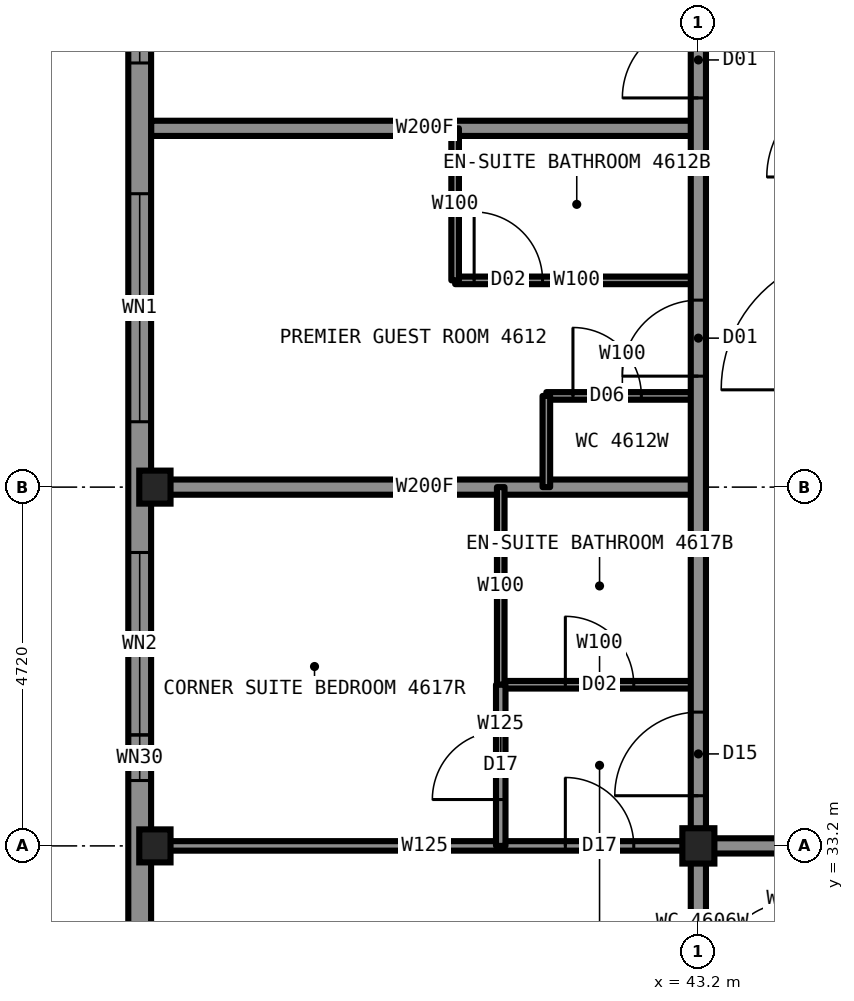
"""IFC4 building model, lengths in metres.
Left out: names, types, materials, properties, quantities, classifications, styles, units other than length and angle.
Written with IfcOpenShell. Run it as: python <this file> out.ifc"""

import sys

from ifc_helpers import new_model, si_unit, direction, frame, frame_2d, origin, origin_2d, place, context, subcontext, project, spatial, rectangle, i_section, extrude, element, fill, save


model = new_model("IFC4")
c1 = context("Model", 3, precision=1e-05, world=origin(), true_north=direction((0.0, 1.0)))
c2 = subcontext(c1, "Body", "Model", "MODEL_VIEW")
j1 = project(units=[si_unit("LENGTHUNIT", "METRE"), si_unit("PLANEANGLEUNIT", "RADIAN")], contexts=[c1])
p1 = place(None, origin())
s1 = spatial("IfcSite", under=j1, at=p1, CompositionType="ELEMENT")
p2 = place(p1, origin())
s2 = spatial("IfcBuilding", under=s1, at=p2, CompositionType="ELEMENT")
p3 = place(p2, frame((0.0, 0.0, 172.3)))
s3 = spatial("IfcBuildingStorey", under=s2, at=p3, CompositionType="ELEMENT", Elevation=172.3)
for number, where, z_axis, x_axis in (
    (1, (36.05, 33.2, 0.0), (0.0, 0.0, 1.0), (1.0, 0.0, 0.0)),
    (2, (36.05, 37.92, 0.0), (0.0, 0.0, 1.0), (1.0, 0.0, 0.0)),
):
    element("IfcColumn", number, at=place(p3, frame(where, z_axis=z_axis, x_axis=x_axis)), inside=s3, PredefinedType="COLUMN", context=c2, shape_type="SweptSolid", body=[
        extrude(i_section(OverallWidth=0.411, OverallDepth=0.434, WebThickness=0.036, FlangeThickness=0.057, at=origin_2d()), origin(), (0.0, 0.0, 1.0), 3.5),
    ])
p4 = place(p3, frame((43.2, 33.2, 0.0), z_axis=(0.0, 0.0, 1.0), x_axis=(1.0, 0.0, 0.0)))
e3 = element("IfcColumn", 3, at=p4, inside=s3, PredefinedType="COLUMN", context=c2, shape_type="SweptSolid", body=[
    extrude(i_section(OverallWidth=0.422, OverallDepth=0.465, WebThickness=0.045, FlangeThickness=0.073, at=origin_2d()), origin(), (0.0, 0.0, 1.0), 3.5),
])
p5 = place(p3, frame((43.2, 33.2, 0.0), z_axis=(0.0, 0.0, 1.0), x_axis=(1.0, 0.0, 0.0)))
e4 = element("IfcWall", 4, at=p5, inside=s3, PredefinedType="PARTITIONING", context=c2, shape_type="SweptSolid", body=[
    extrude(rectangle(XDim=23.6, YDim=0.2, at=frame_2d((11.8, 0.0))), origin(), (0.0, 0.0, 1.0), 3.33),
])
p6 = place(p5, frame((1.46, 0.0, 0.0)))
e5 = element("IfcOpeningElement", 5, at=p6, cuts=e4, PredefinedType="OPENING", context=c2, shape_type="SweptSolid", body=[
    extrude(rectangle(XDim=1.0, YDim=2.2, at=frame_2d((0.5, 1.1))), frame((0.0, 0.11, 0.0), z_axis=(0.0, -1.0, 0.0), x_axis=(1.0, 0.0, 0.0)), (0.0, 0.0, 1.0), 0.22),
])
p7 = place(p5, frame((7.72, 0.0, 0.0)))
e6 = element("IfcOpeningElement", 6, at=p7, cuts=e4, PredefinedType="OPENING", context=c2, shape_type="SweptSolid", body=[
    extrude(rectangle(XDim=1.0, YDim=2.2, at=frame_2d((0.5, 1.1))), frame((0.0, 0.11, 0.0), z_axis=(0.0, -1.0, 0.0), x_axis=(1.0, 0.0, 0.0)), (0.0, 0.0, 1.0), 0.22),
])
p8 = place(p5, frame((17.16, 0.0, 0.0)))
e7 = element("IfcOpeningElement", 7, at=p8, cuts=e4, PredefinedType="OPENING", context=c2, shape_type="SweptSolid", body=[
    extrude(rectangle(XDim=1.0, YDim=2.2, at=frame_2d((0.5, 1.1))), frame((0.0, 0.11, 0.0), z_axis=(0.0, -1.0, 0.0), x_axis=(1.0, 0.0, 0.0)), (0.0, 0.0, 1.0), 0.22),
])
p9 = place(p3, frame((36.0, 33.2, 0.0), z_axis=(0.0, 0.0, 1.0), x_axis=(1.0, 0.0, 0.0)))
e8 = element("IfcWall", 8, at=p9, inside=s3, PredefinedType="PARTITIONING", context=c2, shape_type="SweptSolid", body=[
    extrude(rectangle(XDim=7.2, YDim=0.125, at=frame_2d((3.6, 0.0))), origin(), (0.0, 0.0, 1.0), 2.573),
])
p10 = place(p9, frame((5.45, 0.0, 0.0)))
e9 = element("IfcOpeningElement", 9, at=p10, cuts=e8, PredefinedType="OPENING", context=c2, shape_type="SweptSolid", body=[
    extrude(rectangle(XDim=0.9, YDim=2.2, at=frame_2d((0.45, 1.1))), frame((0.0, 0.073, 0.0), z_axis=(0.0, -1.0, 0.0), x_axis=(1.0, 0.0, 0.0)), (0.0, 0.0, 1.0), 0.145),
])
p11 = place(p3, frame((36.0, 42.64, 0.0), z_axis=(0.0, 0.0, 1.0), x_axis=(1.0, 0.0, 0.0)))
e10 = element("IfcWall", 10, at=p11, inside=s3, PredefinedType="PARTITIONING", context=c2, shape_type="SweptSolid", body=[
    extrude(rectangle(XDim=7.2, YDim=0.2, at=frame_2d((3.6, 0.0))), origin(), (0.0, 0.0, 1.0), 2.73),
])
p12 = place(p3, frame((40.0, 40.64, 0.0), z_axis=(0.0, 0.0, 1.0), x_axis=(1.0, 0.0, 0.0)))
e11 = element("IfcWall", 11, at=p12, inside=s3, PredefinedType="PARTITIONING", context=c2, shape_type="SweptSolid", body=[
    extrude(rectangle(XDim=3.2, YDim=0.1, at=frame_2d((1.6, 0.0))), origin(), (0.0, 0.0, 1.0), 3.33),
])
p13 = place(p12, frame((0.25, 0.0, 0.0)))
e12 = element("IfcOpeningElement", 12, at=p13, cuts=e11, PredefinedType="OPENING", context=c2, shape_type="SweptSolid", body=[
    extrude(rectangle(XDim=0.9, YDim=2.1, at=frame_2d((0.45, 1.05))), frame((0.0, 0.06, 0.0), z_axis=(0.0, -1.0, 0.0), x_axis=(1.0, 0.0, 0.0)), (0.0, 0.0, 1.0), 0.12),
])
p14 = place(p3, frame((41.2, 39.12, 0.0), z_axis=(0.0, 0.0, 1.0), x_axis=(1.0, 0.0, 0.0)))
e13 = element("IfcWall", 13, at=p14, inside=s3, PredefinedType="PARTITIONING", context=c2, shape_type="SweptSolid", body=[
    extrude(rectangle(XDim=2.0, YDim=0.1, at=frame_2d((1.0, 0.0))), origin(), (0.0, 0.0, 1.0), 3.33),
])
p15 = place(p14, frame((0.35, 0.0, 0.0)))
e14 = element("IfcOpeningElement", 14, at=p15, cuts=e13, PredefinedType="OPENING", context=c2, shape_type="SweptSolid", body=[
    extrude(rectangle(XDim=0.9, YDim=2.1, at=frame_2d((0.45, 1.05))), frame((0.0, 0.06, 0.0), z_axis=(0.0, -1.0, 0.0), x_axis=(1.0, 0.0, 0.0)), (0.0, 0.0, 1.0), 0.12),
])
p16 = place(p3, frame((36.0, 37.92, 0.0), z_axis=(0.0, 0.0, 1.0), x_axis=(1.0, 0.0, 0.0)))
e15 = element("IfcWall", 15, at=p16, inside=s3, PredefinedType="PARTITIONING", context=c2, shape_type="SweptSolid", body=[
    extrude(rectangle(XDim=7.2, YDim=0.2, at=frame_2d((3.6, 0.0))), origin(), (0.0, 0.0, 1.0), 2.573),
])
p17 = place(p3, frame((40.6, 35.32, 0.0), z_axis=(0.0, 0.0, 1.0), x_axis=(1.0, 0.0, 0.0)))
e16 = element("IfcWall", 16, at=p17, inside=s3, PredefinedType="PARTITIONING", context=c2, shape_type="SweptSolid", body=[
    extrude(rectangle(XDim=2.6, YDim=0.1, at=frame_2d((1.3, 0.0))), origin(), (0.0, 0.0, 1.0), 3.33),
])
p18 = place(p17, frame((0.85, 0.0, 0.0)))
e17 = element("IfcOpeningElement", 17, at=p18, cuts=e16, PredefinedType="OPENING", context=c2, shape_type="SweptSolid", body=[
    extrude(rectangle(XDim=0.9, YDim=2.1, at=frame_2d((0.45, 1.05))), frame((0.0, 0.06, 0.0), z_axis=(0.0, -1.0, 0.0), x_axis=(1.0, 0.0, 0.0)), (0.0, 0.0, 1.0), 0.12),
])
p19 = place(p3, frame((43.2, 33.2, 0.0), z_axis=(0.0, 0.0, 1.0), x_axis=(0.0, 1.0, 0.0)))
e18 = element("IfcWall", 18, at=p19, inside=s3, PredefinedType="PARTITIONING", context=c2, shape_type="SweptSolid", body=[
    extrude(rectangle(XDim=23.58, YDim=0.2, at=frame_2d((11.79, 0.0))), origin(), (0.0, 0.0, 1.0), 3.33),
])
p20 = place(p19, frame((6.18, 0.0, 0.0)))
e19 = element("IfcOpeningElement", 19, at=p20, cuts=e18, PredefinedType="OPENING", context=c2, shape_type="SweptSolid", body=[
    extrude(rectangle(XDim=1.0, YDim=2.2, at=frame_2d((0.5, 1.1))), frame((0.0, 0.11, 0.0), z_axis=(0.0, -1.0, 0.0), x_axis=(1.0, 0.0, 0.0)), (0.0, 0.0, 1.0), 0.22),
])
p21 = place(p19, frame((9.84, 0.0, 0.0)))
e20 = element("IfcOpeningElement", 20, at=p21, cuts=e18, PredefinedType="OPENING", context=c2, shape_type="SweptSolid", body=[
    extrude(rectangle(XDim=1.0, YDim=2.2, at=frame_2d((0.5, 1.1))), frame((0.0, 0.11, 0.0), z_axis=(0.0, -1.0, 0.0), x_axis=(1.0, 0.0, 0.0)), (0.0, 0.0, 1.0), 0.22),
])
p22 = place(p19, frame((14.56, 0.0, 0.0)))
e21 = element("IfcOpeningElement", 21, at=p22, cuts=e18, PredefinedType="OPENING", context=c2, shape_type="SweptSolid", body=[
    extrude(rectangle(XDim=1.0, YDim=2.2, at=frame_2d((0.5, 1.1))), frame((0.0, 0.11, 0.0), z_axis=(0.0, -1.0, 0.0), x_axis=(1.0, 0.0, 0.0)), (0.0, 0.0, 1.0), 0.22),
])
p23 = place(p19, frame((22.05, 0.0, 0.0)))
e22 = element("IfcOpeningElement", 22, at=p23, cuts=e18, PredefinedType="OPENING", context=c2, shape_type="SweptSolid", body=[
    extrude(rectangle(XDim=1.1, YDim=2.2, at=frame_2d((0.55, 1.1))), frame((0.0, 0.11, 0.0), z_axis=(0.0, -1.0, 0.0), x_axis=(1.0, 0.0, 0.0)), (0.0, 0.0, 1.0), 0.22),
])
p24 = place(p19, frame((0.66, 0.0, 0.0)))
e23 = element("IfcOpeningElement", 23, at=p24, cuts=e18, PredefinedType="OPENING", context=c2, shape_type="SweptSolid", body=[
    extrude(rectangle(XDim=1.1, YDim=2.2, at=frame_2d((0.55, 1.1))), frame((0.0, 0.11, 0.0), z_axis=(0.0, -1.0, 0.0), x_axis=(1.0, 0.0, 0.0)), (0.0, 0.0, 1.0), 0.22),
])
p25 = place(p3, frame((43.2, 26.0, 0.0), z_axis=(0.0, 0.0, 1.0), x_axis=(0.0, 1.0, 0.0)))
e24 = element("IfcWall", 24, at=p25, inside=s3, PredefinedType="PARTITIONING", context=c2, shape_type="SweptSolid", body=[
    extrude(rectangle(XDim=7.2, YDim=0.2, at=frame_2d((3.6, 0.0))), origin(), (0.0, 0.0, 1.0), 2.573),
])
p26 = place(p3, frame((41.2, 37.92, 0.0), z_axis=(0.0, 0.0, 1.0), x_axis=(0.0, 1.0, 0.0)))
e25 = element("IfcWall", 25, at=p26, inside=s3, PredefinedType="PARTITIONING", context=c2, shape_type="SweptSolid", body=[
    extrude(rectangle(XDim=1.2, YDim=0.1, at=frame_2d((0.6, 0.0))), origin(), (0.0, 0.0, 1.0), 3.33),
])
p27 = place(p3, frame((40.6, 35.32, 0.0), z_axis=(0.0, 0.0, 1.0), x_axis=(0.0, 1.0, 0.0)))
e26 = element("IfcWall", 26, at=p27, inside=s3, PredefinedType="PARTITIONING", context=c2, shape_type="SweptSolid", body=[
    extrude(rectangle(XDim=2.6, YDim=0.1, at=frame_2d((1.3, 0.0))), origin(), (0.0, 0.0, 1.0), 3.33),
])
p28 = place(p3, frame((40.6, 33.2, 0.0), z_axis=(0.0, 0.0, 1.0), x_axis=(0.0, 1.0, 0.0)))
e27 = element("IfcWall", 27, at=p28, inside=s3, PredefinedType="PARTITIONING", context=c2, shape_type="SweptSolid", body=[
    extrude(rectangle(XDim=2.12, YDim=0.125, at=frame_2d((1.06, 0.0))), origin(), (0.0, 0.0, 1.0), 3.33),
])
p29 = place(p28, frame((0.61, 0.0, 0.0)))
e28 = element("IfcOpeningElement", 28, at=p29, cuts=e27, PredefinedType="OPENING", context=c2, shape_type="SweptSolid", body=[
    extrude(rectangle(XDim=0.9, YDim=2.2, at=frame_2d((0.45, 1.1))), frame((0.0, 0.073, 0.0), z_axis=(0.0, -1.0, 0.0), x_axis=(1.0, 0.0, 0.0)), (0.0, 0.0, 1.0), 0.145),
])
p30 = place(p3, frame((40.0, 40.64, 0.0), z_axis=(0.0, 0.0, 1.0), x_axis=(0.0, 1.0, 0.0)))
e29 = element("IfcWall", 29, at=p30, inside=s3, PredefinedType="PARTITIONING", context=c2, shape_type="SweptSolid", body=[
    extrude(rectangle(XDim=2.0, YDim=0.1, at=frame_2d((1.0, 0.0))), origin(), (0.0, 0.0, 1.0), 3.33),
])
p31 = place(p3, frame((35.85, 58.8, 0.0), z_axis=(0.0, 0.0, 1.0), x_axis=(0.0, -1.0, 0.0)))
e30 = element("IfcWall", 30, at=p31, inside=s3, PredefinedType="SOLIDWALL", context=c2, shape_type="SweptSolid", body=[
    extrude(rectangle(XDim=27.6, YDim=0.3, at=frame_2d((13.8, 0.0))), origin(), (0.0, 0.0, 1.0), 2.83),
])
p32 = place(p31, frame((3.46, 0.0, 0.3)))
e31 = element("IfcOpeningElement", 31, at=p32, cuts=e30, PredefinedType="OPENING", context=c2, shape_type="SweptSolid", body=[
    extrude(rectangle(XDim=2.4, YDim=2.0, at=frame_2d((1.2, 1.0))), frame((0.0, 0.16, 0.0), z_axis=(0.0, -1.0, 0.0), x_axis=(1.0, 0.0, 0.0)), (0.0, 0.0, 1.0), 0.32),
])
p33 = place(p31, frame((7.58, 0.0, 0.3)))
e32 = element("IfcOpeningElement", 32, at=p33, cuts=e30, PredefinedType="OPENING", context=c2, shape_type="SweptSolid", body=[
    extrude(rectangle(XDim=3.0, YDim=2.0, at=frame_2d((1.5, 1.0))), frame((0.0, 0.16, 0.0), z_axis=(0.0, -1.0, 0.0), x_axis=(1.0, 0.0, 0.0)), (0.0, 0.0, 1.0), 0.32),
])
p34 = place(p31, frame((12.3, 0.0, 0.3)))
e33 = element("IfcOpeningElement", 33, at=p34, cuts=e30, PredefinedType="OPENING", context=c2, shape_type="SweptSolid", body=[
    extrude(rectangle(XDim=3.0, YDim=2.0, at=frame_2d((1.5, 1.0))), frame((0.0, 0.16, 0.0), z_axis=(0.0, -1.0, 0.0), x_axis=(1.0, 0.0, 0.0)), (0.0, 0.0, 1.0), 0.32),
])
p35 = place(p31, frame((17.02, 0.0, 0.3)))
e34 = element("IfcOpeningElement", 34, at=p35, cuts=e30, PredefinedType="OPENING", context=c2, shape_type="SweptSolid", body=[
    extrude(rectangle(XDim=3.0, YDim=2.0, at=frame_2d((1.5, 1.0))), frame((0.0, 0.16, 0.0), z_axis=(0.0, -1.0, 0.0), x_axis=(1.0, 0.0, 0.0)), (0.0, 0.0, 1.0), 0.32),
])
p36 = place(p31, frame((21.74, 0.0, 0.3)))
e35 = element("IfcOpeningElement", 35, at=p36, cuts=e30, PredefinedType="OPENING", context=c2, shape_type="SweptSolid", body=[
    extrude(rectangle(XDim=2.4, YDim=2.0, at=frame_2d((1.2, 1.0))), frame((0.0, 0.16, 0.0), z_axis=(0.0, -1.0, 0.0), x_axis=(1.0, 0.0, 0.0)), (0.0, 0.0, 1.0), 0.32),
])
p37 = place(p31, frame((2.86, 0.0, 0.3)))
e36 = element("IfcOpeningElement", 36, at=p37, cuts=e30, PredefinedType="OPENING", context=c2, shape_type="SweptSolid", body=[
    extrude(rectangle(XDim=0.6, YDim=1.1, at=frame_2d((0.3, 0.55))), frame((0.0, 0.16, 0.0), z_axis=(0.0, -1.0, 0.0), x_axis=(1.0, 0.0, 0.0)), (0.0, 0.0, 1.0), 0.32),
])
p38 = place(p31, frame((24.14, 0.0, 0.3)))
e37 = element("IfcOpeningElement", 37, at=p38, cuts=e30, PredefinedType="OPENING", context=c2, shape_type="SweptSolid", body=[
    extrude(rectangle(XDim=0.6, YDim=1.1, at=frame_2d((0.3, 0.55))), frame((0.0, 0.16, 0.0), z_axis=(0.0, -1.0, 0.0), x_axis=(1.0, 0.0, 0.0)), (0.0, 0.0, 1.0), 0.32),
])
p39 = place(p20, origin())
e38 = element("IfcDoor", 38, at=p39, inside=s3, OperationType="SINGLE_SWING_LEFT", PredefinedType="DOOR", context=c2, shape_type="SweptSolid", body=[
    extrude(rectangle(XDim=1.0, YDim=2.2, at=frame_2d((0.5, 1.1))), frame((0.0, 0.025, 0.0), z_axis=(0.0, -1.0, 0.0), x_axis=(1.0, 0.0, 0.0)), (0.0, 0.0, 1.0), 0.05),
])
fill(e19, e38)
p40 = place(p13, origin())
e39 = element("IfcDoor", 39, at=p40, inside=s3, OperationType="SINGLE_SWING_RIGHT", PredefinedType="DOOR", context=c2, shape_type="SweptSolid", body=[
    extrude(rectangle(XDim=0.9, YDim=2.1, at=frame_2d((0.45, 1.05))), frame((0.0, 0.025, 0.0), z_axis=(0.0, -1.0, 0.0), x_axis=(1.0, 0.0, 0.0)), (0.0, 0.0, 1.0), 0.05),
])
fill(e12, e39)
p41 = place(p15, origin())
e40 = element("IfcDoor", 40, at=p41, inside=s3, OperationType="SINGLE_SWING_LEFT", PredefinedType="DOOR", context=c2, shape_type="SweptSolid", body=[
    extrude(rectangle(XDim=0.9, YDim=2.1, at=frame_2d((0.45, 1.05))), frame((0.0, 0.025, 0.0), z_axis=(0.0, -1.0, 0.0), x_axis=(1.0, 0.0, 0.0)), (0.0, 0.0, 1.0), 0.05),
])
fill(e14, e40)
p42 = place(p21, origin())
e41 = element("IfcDoor", 41, at=p42, inside=s3, OperationType="SINGLE_SWING_LEFT", PredefinedType="DOOR", context=c2, shape_type="SweptSolid", body=[
    extrude(rectangle(XDim=1.0, YDim=2.2, at=frame_2d((0.5, 1.1))), frame((0.0, 0.025, 0.0), z_axis=(0.0, -1.0, 0.0), x_axis=(1.0, 0.0, 0.0)), (0.0, 0.0, 1.0), 0.05),
])
fill(e20, e41)
p43 = place(p10, origin())
e42 = element("IfcDoor", 42, at=p43, inside=s3, OperationType="SINGLE_SWING_LEFT", PredefinedType="DOOR", context=c2, shape_type="SweptSolid", body=[
    extrude(rectangle(XDim=0.9, YDim=2.2, at=frame_2d((0.45, 1.1))), frame((0.0, 0.025, 0.0), z_axis=(0.0, -1.0, 0.0), x_axis=(1.0, 0.0, 0.0)), (0.0, 0.0, 1.0), 0.05),
])
fill(e9, e42)
p44 = place(p18, origin())
e43 = element("IfcDoor", 43, at=p44, inside=s3, OperationType="SINGLE_SWING_RIGHT", PredefinedType="DOOR", context=c2, shape_type="SweptSolid", body=[
    extrude(rectangle(XDim=0.9, YDim=2.1, at=frame_2d((0.45, 1.05))), frame((0.0, 0.025, 0.0), z_axis=(0.0, -1.0, 0.0), x_axis=(1.0, 0.0, 0.0)), (0.0, 0.0, 1.0), 0.05),
])
fill(e17, e43)
p45 = place(p24, origin())
e44 = element("IfcDoor", 44, at=p45, inside=s3, OperationType="SINGLE_SWING_LEFT", PredefinedType="DOOR", context=c2, shape_type="SweptSolid", body=[
    extrude(rectangle(XDim=1.1, YDim=2.2, at=frame_2d((0.55, 1.1))), frame((0.0, 0.025, 0.0), z_axis=(0.0, -1.0, 0.0), x_axis=(1.0, 0.0, 0.0)), (0.0, 0.0, 1.0), 0.05),
])
fill(e23, e44)
p46 = place(p29, origin())
e45 = element("IfcDoor", 45, at=p46, inside=s3, OperationType="SINGLE_SWING_LEFT", PredefinedType="DOOR", context=c2, shape_type="SweptSolid", body=[
    extrude(rectangle(XDim=0.9, YDim=2.2, at=frame_2d((0.45, 1.1))), frame((0.0, 0.025, 0.0), z_axis=(0.0, -1.0, 0.0), x_axis=(1.0, 0.0, 0.0)), (0.0, 0.0, 1.0), 0.05),
])
fill(e28, e45)
p47 = place(p34, origin())
e46 = element("IfcWindow", 46, at=p47, inside=s3, PartitioningType="SINGLE_PANEL", PredefinedType="WINDOW", context=c2, shape_type="SweptSolid", body=[
    extrude(rectangle(XDim=3.0, YDim=2.0, at=frame_2d((1.5, 1.0))), frame((0.0, 0.13, 0.0), z_axis=(0.0, -1.0, 0.0), x_axis=(1.0, 0.0, 0.0)), (0.0, 0.0, 1.0), 0.06),
])
fill(e33, e46)
p48 = place(p35, origin())
e47 = element("IfcWindow", 47, at=p48, inside=s3, PartitioningType="SINGLE_PANEL", PredefinedType="WINDOW", context=c2, shape_type="SweptSolid", body=[
    extrude(rectangle(XDim=3.0, YDim=2.0, at=frame_2d((1.5, 1.0))), frame((0.0, 0.13, 0.0), z_axis=(0.0, -1.0, 0.0), x_axis=(1.0, 0.0, 0.0)), (0.0, 0.0, 1.0), 0.06),
])
fill(e34, e47)
p49 = place(p36, origin())
e48 = element("IfcWindow", 48, at=p49, inside=s3, PartitioningType="SINGLE_PANEL", PredefinedType="WINDOW", context=c2, shape_type="SweptSolid", body=[
    extrude(rectangle(XDim=2.4, YDim=2.0, at=frame_2d((1.2, 1.0))), frame((0.0, 0.13, 0.0), z_axis=(0.0, -1.0, 0.0), x_axis=(1.0, 0.0, 0.0)), (0.0, 0.0, 1.0), 0.06),
])
fill(e35, e48)
p50 = place(p38, origin())
e49 = element("IfcWindow", 49, at=p50, inside=s3, PartitioningType="SINGLE_PANEL", PredefinedType="WINDOW", context=c2, shape_type="SweptSolid", body=[
    extrude(rectangle(XDim=0.6, YDim=1.1, at=frame_2d((0.3, 0.55))), frame((0.0, 0.13, 0.0), z_axis=(0.0, -1.0, 0.0), x_axis=(1.0, 0.0, 0.0)), (0.0, 0.0, 1.0), 0.06),
])
fill(e37, e49)
save(model, sys.argv[1])
